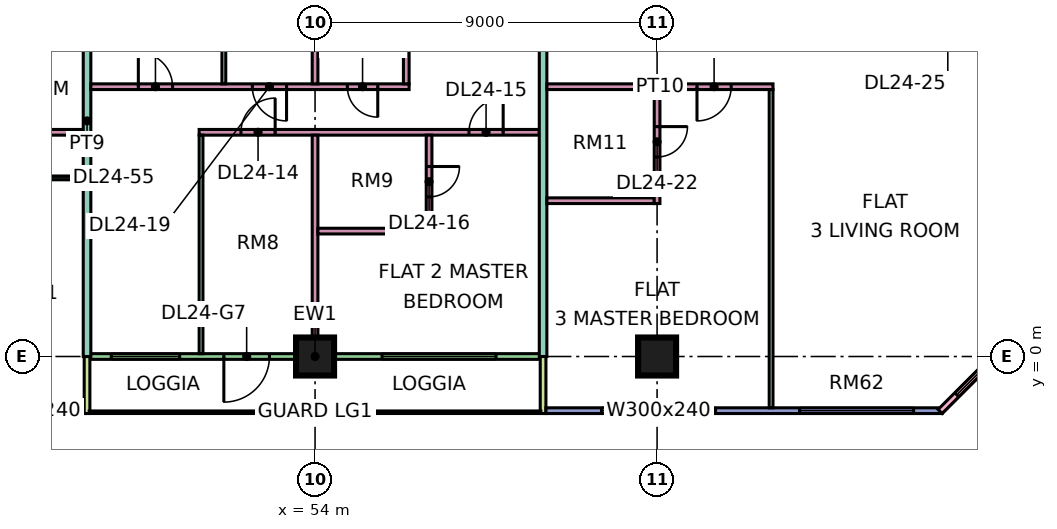
"""IFC4 building model, lengths in metres.
Left out: names, types, materials, properties, quantities, classifications, styles, units other than length and angle.
Written with IfcOpenShell. Run it as: python <this file> out.ifc"""

import sys

from ifc_helpers import new_model, si_unit, direction, frame, frame_2d, origin, origin_2d, place, context, subcontext, project, spatial, rectangle, extrude, element, fill, save


model = new_model("IFC4")
c1 = context("Model", 3, precision=1e-05, world=origin(), true_north=direction((0.0, 1.0)))
c2 = subcontext(c1, "Body", "Model", "MODEL_VIEW")
j1 = project(units=[si_unit("LENGTHUNIT", "METRE"), si_unit("PLANEANGLEUNIT", "RADIAN")], contexts=[c1])
p1 = place(None, origin())
s1 = spatial("IfcSite", under=j1, at=p1, CompositionType="ELEMENT")
p2 = place(p1, origin())
s2 = spatial("IfcBuilding", under=s1, at=p2, CompositionType="ELEMENT")
p3 = place(p2, frame((0.0, 0.0, 106.9)))
s3 = spatial("IfcBuildingStorey", under=s2, at=p3, CompositionType="ELEMENT", Elevation=106.9)
for number, where, z_axis, x_axis in (
    (1, (54.0, 0.0, 0.0), (0.0, 0.0, 1.0), (1.0, 0.0, 0.0)),
    (2, (63.0, 0.0, 0.0), (0.0, 0.0, 1.0), (1.0, 0.0, 0.0)),
):
    element("IfcColumn", number, at=place(p3, frame(where, z_axis=z_axis, x_axis=x_axis)), inside=s3, PredefinedType="COLUMN", context=c2, shape_type="SweptSolid", body=[
        extrude(rectangle(XDim=1.0, YDim=1.0, at=origin_2d()), origin(), (0.0, 0.0, 1.0), 3.75),
    ])
p4 = place(p3, frame((36.075, -1.425, 0.0), z_axis=(0.0, 0.0, 1.0), x_axis=(1.0, 0.0, 0.0)))
e3 = element("IfcWall", 3, at=p4, inside=s3, PredefinedType="SOLIDWALL", context=c2, shape_type="SweptSolid", body=[
    extrude(rectangle(XDim=11.85, YDim=0.15, at=frame_2d((5.925, 0.0))), origin(), (0.0, 0.0, 1.0), 3.35),
])
p5 = place(p4, frame((1.462, 0.0, 0.45)))
e4 = element("IfcOpeningElement", 4, at=p5, cuts=e3, PredefinedType="OPENING", context=c2, shape_type="SweptSolid", body=[
    extrude(rectangle(XDim=3.0, YDim=2.4, at=frame_2d((1.5, 1.2))), frame((0.0, 0.085, 0.0), z_axis=(0.0, -1.0, 0.0), x_axis=(1.0, 0.0, 0.0)), (0.0, 0.0, 1.0), 0.17),
])
p6 = place(p4, frame((6.525, 0.0, 0.45)))
e5 = element("IfcOpeningElement", 5, at=p6, cuts=e3, PredefinedType="OPENING", context=c2, shape_type="SweptSolid", body=[
    extrude(rectangle(XDim=1.8, YDim=2.4, at=frame_2d((0.9, 1.2))), frame((0.0, 0.085, 0.0), z_axis=(0.0, -1.0, 0.0), x_axis=(1.0, 0.0, 0.0)), (0.0, 0.0, 1.0), 0.17),
])
p7 = place(p4, frame((9.488, 0.0, 0.45)))
e6 = element("IfcOpeningElement", 6, at=p7, cuts=e3, PredefinedType="OPENING", context=c2, shape_type="SweptSolid", body=[
    extrude(rectangle(XDim=1.8, YDim=2.4, at=frame_2d((0.9, 1.2))), frame((0.0, 0.085, 0.0), z_axis=(0.0, -1.0, 0.0), x_axis=(1.0, 0.0, 0.0)), (0.0, 0.0, 1.0), 0.17),
])
p8 = place(p3, frame((48.075, 0.0, 0.0), z_axis=(0.0, 0.0, 1.0), x_axis=(1.0, 0.0, 0.0)))
e7 = element("IfcWall", 7, at=p8, inside=s3, PredefinedType="SOLIDWALL", context=c2, shape_type="SweptSolid", body=[
    extrude(rectangle(XDim=11.85, YDim=0.15, at=frame_2d((5.925, 0.0))), origin(), (0.0, 0.0, 1.0), 3.35),
])
p9 = place(p8, frame((0.562, 0.0, 0.45)))
e8 = element("IfcOpeningElement", 8, at=p9, cuts=e7, PredefinedType="OPENING", context=c2, shape_type="SweptSolid", body=[
    extrude(rectangle(XDim=1.8, YDim=2.4, at=frame_2d((0.9, 1.2))), frame((0.0, 0.085, 0.0), z_axis=(0.0, -1.0, 0.0), x_axis=(1.0, 0.0, 0.0)), (0.0, 0.0, 1.0), 0.17),
])
p10 = place(p8, frame((3.525, 0.0, 0.0)))
e9 = element("IfcOpeningElement", 9, at=p10, cuts=e7, PredefinedType="OPENING", context=c2, shape_type="SweptSolid", body=[
    extrude(rectangle(XDim=1.2, YDim=2.4, at=frame_2d((0.6, 1.2))), frame((0.0, 0.085, 0.0), z_axis=(0.0, -1.0, 0.0), x_axis=(1.0, 0.0, 0.0)), (0.0, 0.0, 1.0), 0.17),
])
p11 = place(p8, frame((7.688, 0.0, 0.45)))
e10 = element("IfcOpeningElement", 10, at=p11, cuts=e7, PredefinedType="OPENING", context=c2, shape_type="SweptSolid", body=[
    extrude(rectangle(XDim=3.0, YDim=2.4, at=frame_2d((1.5, 1.2))), frame((0.0, 0.085, 0.0), z_axis=(0.0, -1.0, 0.0), x_axis=(1.0, 0.0, 0.0)), (0.0, 0.0, 1.0), 0.17),
])
for number, where, z_axis, x_axis in (
    (11, (48.0, -1.5, 0.0), (0.0, 0.0, 1.0), (0.0, 1.0, 0.0)),
    (12, (60.0, -1.5, 0.0), (0.0, 0.0, 1.0), (0.0, 1.0, 0.0)),
):
    element("IfcWall", number, at=place(p3, frame(where, z_axis=z_axis, x_axis=x_axis)), inside=s3, PredefinedType="SOLIDWALL", context=c2, shape_type="SweptSolid", body=[
        extrude(rectangle(XDim=1.5, YDim=0.15, at=frame_2d((0.75, 0.0))), origin(), (0.0, 0.0, 1.0), 3.35),
    ])
p12 = place(p3, frame((60.075, -1.425, 0.0), z_axis=(0.0, 0.0, 1.0), x_axis=(1.0, 0.0, 0.0)))
e13 = element("IfcWall", 13, at=p12, inside=s3, PredefinedType="SOLIDWALL", context=c2, shape_type="SweptSolid", body=[
    extrude(rectangle(XDim=10.425, YDim=0.15, at=frame_2d((5.212, 0.0))), origin(), (0.0, 0.0, 1.0), 3.35),
])
p13 = place(p12, frame((1.462, 0.0, 0.45)))
e14 = element("IfcOpeningElement", 14, at=p13, cuts=e13, PredefinedType="OPENING", context=c2, shape_type="SweptSolid", body=[
    extrude(rectangle(XDim=3.0, YDim=2.4, at=frame_2d((1.5, 1.2))), frame((0.0, 0.085, 0.0), z_axis=(0.0, -1.0, 0.0), x_axis=(1.0, 0.0, 0.0)), (0.0, 0.0, 1.0), 0.17),
])
p14 = place(p12, frame((6.675, 0.0, 0.45)))
e15 = element("IfcOpeningElement", 15, at=p14, cuts=e13, PredefinedType="OPENING", context=c2, shape_type="SweptSolid", body=[
    extrude(rectangle(XDim=3.0, YDim=2.4, at=frame_2d((1.5, 1.2))), frame((0.0, 0.085, 0.0), z_axis=(0.0, -1.0, 0.0), x_axis=(1.0, 0.0, 0.0)), (0.0, 0.0, 1.0), 0.17),
])
p15 = place(p3, frame((70.447, -1.447, 0.0), z_axis=(0.0, 0.0, 1.0), x_axis=(0.707106781187, 0.707106781187, 0.0)))
e16 = element("IfcWall", 16, at=p15, inside=s3, PredefinedType="SOLIDWALL", context=c2, shape_type="SweptSolid", body=[
    extrude(rectangle(XDim=4.243, YDim=0.15, at=frame_2d((2.121, 0.0))), origin(), (0.0, 0.0, 1.0), 3.35),
])
p16 = place(p15, frame((0.621, 0.0, 0.45)))
e17 = element("IfcOpeningElement", 17, at=p16, cuts=e16, PredefinedType="OPENING", context=c2, shape_type="SweptSolid", body=[
    extrude(rectangle(XDim=3.0, YDim=2.4, at=frame_2d((1.5, 1.2))), frame((0.0, 0.085, 0.0), z_axis=(0.0, -1.0, 0.0), x_axis=(1.0, 0.0, 0.0)), (0.0, 0.0, 1.0), 0.17),
])
p17 = place(p3, frame((33.05, 4.7, 0.0), z_axis=(0.0, 0.0, 1.0), x_axis=(1.0, 0.0, 0.0)))
e18 = element("IfcWall", 18, at=p17, inside=s3, PredefinedType="PARTITIONING", context=c2, shape_type="SweptSolid", body=[
    extrude(rectangle(XDim=14.85, YDim=0.1, at=frame_2d((7.425, 0.0))), origin(), (0.0, 0.0, 1.0), 3.35),
])
p18 = place(p17, frame((10.0, 0.0, 0.0)))
e19 = element("IfcOpeningElement", 19, at=p18, cuts=e18, PredefinedType="OPENING", context=c2, shape_type="SweptSolid", body=[
    extrude(rectangle(XDim=0.9, YDim=2.1, at=frame_2d((0.45, 1.05))), frame((0.0, 0.06, 0.0), z_axis=(0.0, -1.0, 0.0), x_axis=(1.0, 0.0, 0.0)), (0.0, 0.0, 1.0), 0.12),
])
p19 = place(p17, frame((13.0, 0.0, 0.0)))
e20 = element("IfcOpeningElement", 20, at=p19, cuts=e18, PredefinedType="OPENING", context=c2, shape_type="SweptSolid", body=[
    extrude(rectangle(XDim=0.9, YDim=2.1, at=frame_2d((0.45, 1.05))), frame((0.0, 0.06, 0.0), z_axis=(0.0, -1.0, 0.0), x_axis=(1.0, 0.0, 0.0)), (0.0, 0.0, 1.0), 0.12),
])
p20 = place(p17, frame((4.0, 0.0, 0.0)))
e21 = element("IfcOpeningElement", 21, at=p20, cuts=e18, PredefinedType="OPENING", context=c2, shape_type="SweptSolid", body=[
    extrude(rectangle(XDim=0.9, YDim=2.1, at=frame_2d((0.45, 1.05))), frame((0.0, 0.06, 0.0), z_axis=(0.0, -1.0, 0.0), x_axis=(1.0, 0.0, 0.0)), (0.0, 0.0, 1.0), 0.12),
])
p21 = place(p3, frame((43.725, 5.9, 0.0), z_axis=(0.0, 0.0, 1.0), x_axis=(1.0, 0.0, 0.0)))
e22 = element("IfcWall", 22, at=p21, inside=s3, PredefinedType="PARTITIONING", context=c2, shape_type="SweptSolid", body=[
    extrude(rectangle(XDim=4.175, YDim=0.15, at=frame_2d((2.087, 0.0))), origin(), (0.0, 0.0, 1.0), 3.35),
])
p22 = place(p21, frame((1.675, 0.0, 0.0)))
e23 = element("IfcOpeningElement", 23, at=p22, cuts=e22, PredefinedType="OPENING", context=c2, shape_type="SweptSolid", body=[
    extrude(rectangle(XDim=0.8, YDim=2.1, at=frame_2d((0.4, 1.05))), frame((0.0, 0.085, 0.0), z_axis=(0.0, -1.0, 0.0), x_axis=(1.0, 0.0, 0.0)), (0.0, 0.0, 1.0), 0.17),
])
p23 = place(p3, frame((48.0, 0.0, 0.0), z_axis=(0.0, 0.0, 1.0), x_axis=(0.0, 1.0, 0.0)))
e24 = element("IfcWall", 24, at=p23, inside=s3, PredefinedType="PARTITIONING", context=c2, shape_type="SweptSolid", body=[
    extrude(rectangle(XDim=12.4, YDim=0.2, at=frame_2d((6.2, 0.0))), origin(), (0.0, 0.0, 1.0), 3.35),
])
p24 = place(p3, frame((48.1, 7.1, 0.0), z_axis=(0.0, 0.0, 1.0), x_axis=(1.0, 0.0, 0.0)))
e25 = element("IfcWall", 25, at=p24, inside=s3, PredefinedType="PARTITIONING", context=c2, shape_type="SweptSolid", body=[
    extrude(rectangle(XDim=8.375, YDim=0.15, at=frame_2d((4.188, 0.0))), origin(), (0.0, 0.0, 1.0), 3.35),
])
p25 = place(p24, frame((6.75, 0.0, 0.0)))
e26 = element("IfcOpeningElement", 26, at=p25, cuts=e25, PredefinedType="OPENING", context=c2, shape_type="SweptSolid", body=[
    extrude(rectangle(XDim=0.8, YDim=2.1, at=frame_2d((0.4, 1.05))), frame((0.0, 0.085, 0.0), z_axis=(0.0, -1.0, 0.0), x_axis=(1.0, 0.0, 0.0)), (0.0, 0.0, 1.0), 0.17),
])
p26 = place(p24, frame((1.25, 0.0, 0.0)))
e27 = element("IfcOpeningElement", 27, at=p26, cuts=e25, PredefinedType="OPENING", context=c2, shape_type="SweptSolid", body=[
    extrude(rectangle(XDim=0.9, YDim=2.1, at=frame_2d((0.45, 1.05))), frame((0.0, 0.085, 0.0), z_axis=(0.0, -1.0, 0.0), x_axis=(1.0, 0.0, 0.0)), (0.0, 0.0, 1.0), 0.17),
])
p27 = place(p24, frame((4.25, 0.0, 0.0)))
e28 = element("IfcOpeningElement", 28, at=p27, cuts=e25, PredefinedType="OPENING", context=c2, shape_type="SweptSolid", body=[
    extrude(rectangle(XDim=0.9, YDim=2.1, at=frame_2d((0.45, 1.05))), frame((0.0, 0.085, 0.0), z_axis=(0.0, -1.0, 0.0), x_axis=(1.0, 0.0, 0.0)), (0.0, 0.0, 1.0), 0.17),
])
p28 = place(p3, frame((50.95, 5.9, 0.0), z_axis=(0.0, 0.0, 1.0), x_axis=(1.0, 0.0, 0.0)))
e29 = element("IfcWall", 29, at=p28, inside=s3, PredefinedType="PARTITIONING", context=c2, shape_type="SweptSolid", body=[
    extrude(rectangle(XDim=8.95, YDim=0.15, at=frame_2d((4.475, 0.0))), origin(), (0.0, 0.0, 1.0), 3.35),
])
p29 = place(p28, frame((1.1, 0.0, 0.0)))
e30 = element("IfcOpeningElement", 30, at=p29, cuts=e29, PredefinedType="OPENING", context=c2, shape_type="SweptSolid", body=[
    extrude(rectangle(XDim=0.9, YDim=2.1, at=frame_2d((0.45, 1.05))), frame((0.0, 0.085, 0.0), z_axis=(0.0, -1.0, 0.0), x_axis=(1.0, 0.0, 0.0)), (0.0, 0.0, 1.0), 0.17),
])
p30 = place(p28, frame((7.1, 0.0, 0.0)))
e31 = element("IfcOpeningElement", 31, at=p30, cuts=e29, PredefinedType="OPENING", context=c2, shape_type="SweptSolid", body=[
    extrude(rectangle(XDim=0.9, YDim=2.1, at=frame_2d((0.45, 1.05))), frame((0.0, 0.085, 0.0), z_axis=(0.0, -1.0, 0.0), x_axis=(1.0, 0.0, 0.0)), (0.0, 0.0, 1.0), 0.17),
])
p31 = place(p3, frame((51.0, 0.074, 0.0), z_axis=(0.0, 0.0, 1.0), x_axis=(0.0, 1.0, 0.0)))
e32 = element("IfcWall", 32, at=p31, inside=s3, PredefinedType="PARTITIONING", context=c2, shape_type="SweptSolid", body=[
    extrude(rectangle(XDim=5.751, YDim=0.1, at=frame_2d((2.875, 0.0))), origin(), (0.0, 0.0, 1.0), 3.35),
])
p32 = place(p3, frame((51.6, 7.175, 0.0), z_axis=(0.0, 0.0, 1.0), x_axis=(0.0, 1.0, 0.0)))
e33 = element("IfcWall", 33, at=p32, inside=s3, PredefinedType="PARTITIONING", context=c2, shape_type="SweptSolid", body=[
    extrude(rectangle(XDim=5.225, YDim=0.1, at=frame_2d((2.612, 0.0))), origin(), (0.0, 0.0, 1.0), 3.35),
])
p33 = place(p3, frame((54.0, 0.074, 0.0), z_axis=(0.0, 0.0, 1.0), x_axis=(0.0, 1.0, 0.0)))
e34 = element("IfcWall", 34, at=p33, inside=s3, PredefinedType="PARTITIONING", context=c2, shape_type="SweptSolid", body=[
    extrude(rectangle(XDim=5.751, YDim=0.15, at=frame_2d((2.875, 0.0))), origin(), (0.0, 0.0, 1.0), 3.35),
])
p34 = place(p3, frame((54.0, 7.175, 0.0), z_axis=(0.0, 0.0, 1.0), x_axis=(0.0, 1.0, 0.0)))
e35 = element("IfcWall", 35, at=p34, inside=s3, PredefinedType="PARTITIONING", context=c2, shape_type="SweptSolid", body=[
    extrude(rectangle(XDim=5.225, YDim=0.15, at=frame_2d((2.612, 0.0))), origin(), (0.0, 0.0, 1.0), 3.35),
])
p35 = place(p3, frame((54.075, 3.3, 0.0), z_axis=(0.0, 0.0, 1.0), x_axis=(1.0, 0.0, 0.0)))
e36 = element("IfcWall", 36, at=p35, inside=s3, PredefinedType="PARTITIONING", context=c2, shape_type="SweptSolid", body=[
    extrude(rectangle(XDim=3.0, YDim=0.15, at=frame_2d((1.5, 0.0))), origin(), (0.0, 0.0, 1.0), 3.35),
])
p36 = place(p3, frame((56.4, 7.175, 0.0), z_axis=(0.0, 0.0, 1.0), x_axis=(0.0, 1.0, 0.0)))
e37 = element("IfcWall", 37, at=p36, inside=s3, PredefinedType="PARTITIONING", context=c2, shape_type="SweptSolid", body=[
    extrude(rectangle(XDim=5.225, YDim=0.15, at=frame_2d((2.612, 0.0))), origin(), (0.0, 0.0, 1.0), 3.35),
])
p37 = place(p3, frame((57.0, 3.375, 0.0), z_axis=(0.0, 0.0, 1.0), x_axis=(0.0, 1.0, 0.0)))
e38 = element("IfcWall", 38, at=p37, inside=s3, PredefinedType="PARTITIONING", context=c2, shape_type="SweptSolid", body=[
    extrude(rectangle(XDim=2.45, YDim=0.15, at=frame_2d((1.225, 0.0))), origin(), (0.0, 0.0, 1.0), 3.35),
])
p38 = place(p37, frame((0.825, 0.0, 0.0)))
e39 = element("IfcOpeningElement", 39, at=p38, cuts=e38, PredefinedType="OPENING", context=c2, shape_type="SweptSolid", body=[
    extrude(rectangle(XDim=0.8, YDim=2.1, at=frame_2d((0.4, 1.05))), frame((0.0, 0.085, 0.0), z_axis=(0.0, -1.0, 0.0), x_axis=(1.0, 0.0, 0.0)), (0.0, 0.0, 1.0), 0.17),
])
p39 = place(p3, frame((60.0, 0.0, 0.0), z_axis=(0.0, 0.0, 1.0), x_axis=(0.0, 1.0, 0.0)))
e40 = element("IfcWall", 40, at=p39, inside=s3, PredefinedType="PARTITIONING", context=c2, shape_type="SweptSolid", body=[
    extrude(rectangle(XDim=12.4, YDim=0.2, at=frame_2d((6.2, 0.0))), origin(), (0.0, 0.0, 1.0), 3.35),
])
p40 = place(p3, frame((60.1, 4.1, 0.0), z_axis=(0.0, 0.0, 1.0), x_axis=(1.0, 0.0, 0.0)))
e41 = element("IfcWall", 41, at=p40, inside=s3, PredefinedType="PARTITIONING", context=c2, shape_type="SweptSolid", body=[
    extrude(rectangle(XDim=2.825, YDim=0.15, at=frame_2d((1.413, 0.0))), origin(), (0.0, 0.0, 1.0), 3.35),
])
p41 = place(p3, frame((60.1, 7.1, 0.0), z_axis=(0.0, 0.0, 1.0), x_axis=(1.0, 0.0, 0.0)))
e42 = element("IfcWall", 42, at=p41, inside=s3, PredefinedType="PARTITIONING", context=c2, shape_type="SweptSolid", body=[
    extrude(rectangle(XDim=5.95, YDim=0.15, at=frame_2d((2.975, 0.0))), origin(), (0.0, 0.0, 1.0), 3.35),
])
p42 = place(p41, frame((3.95, 0.0, 0.0)))
e43 = element("IfcOpeningElement", 43, at=p42, cuts=e42, PredefinedType="OPENING", context=c2, shape_type="SweptSolid", body=[
    extrude(rectangle(XDim=0.9, YDim=2.1, at=frame_2d((0.45, 1.05))), frame((0.0, 0.085, 0.0), z_axis=(0.0, -1.0, 0.0), x_axis=(1.0, 0.0, 0.0)), (0.0, 0.0, 1.0), 0.17),
])
p43 = place(p3, frame((63.0, 4.025, 0.0), z_axis=(0.0, 0.0, 1.0), x_axis=(0.0, 1.0, 0.0)))
e44 = element("IfcWall", 44, at=p43, inside=s3, PredefinedType="PARTITIONING", context=c2, shape_type="SweptSolid", body=[
    extrude(rectangle(XDim=3.0, YDim=0.15, at=frame_2d((1.5, 0.0))), origin(), (0.0, 0.0, 1.0), 3.35),
])
p44 = place(p43, frame((1.225, 0.0, 0.0)))
e45 = element("IfcOpeningElement", 45, at=p44, cuts=e44, PredefinedType="OPENING", context=c2, shape_type="SweptSolid", body=[
    extrude(rectangle(XDim=0.8, YDim=2.1, at=frame_2d((0.4, 1.05))), frame((0.0, 0.085, 0.0), z_axis=(0.0, -1.0, 0.0), x_axis=(1.0, 0.0, 0.0)), (0.0, 0.0, 1.0), 0.17),
])
p45 = place(p3, frame((66.0, -1.35, 0.0), z_axis=(0.0, 0.0, 1.0), x_axis=(0.0, 1.0, 0.0)))
e46 = element("IfcWall", 46, at=p45, inside=s3, PredefinedType="PARTITIONING", context=c2, shape_type="SweptSolid", body=[
    extrude(rectangle(XDim=8.375, YDim=0.1, at=frame_2d((4.188, 0.0))), origin(), (0.0, 0.0, 1.0), 3.35),
])
p46 = place(p7, origin())
e47 = element("IfcWindow", 47, at=p46, inside=s3, PartitioningType="SINGLE_PANEL", PredefinedType="WINDOW", context=c2, shape_type="SweptSolid", body=[
    extrude(rectangle(XDim=1.8, YDim=2.4, at=frame_2d((0.9, 1.2))), frame((0.0, 0.03, 0.0), z_axis=(0.0, -1.0, 0.0), x_axis=(1.0, 0.0, 0.0)), (0.0, 0.0, 1.0), 0.06),
])
fill(e6, e47)
p47 = place(p9, origin())
e48 = element("IfcWindow", 48, at=p47, inside=s3, PartitioningType="SINGLE_PANEL", PredefinedType="WINDOW", context=c2, shape_type="SweptSolid", body=[
    extrude(rectangle(XDim=1.8, YDim=2.4, at=frame_2d((0.9, 1.2))), frame((0.0, 0.03, 0.0), z_axis=(0.0, -1.0, 0.0), x_axis=(1.0, 0.0, 0.0)), (0.0, 0.0, 1.0), 0.06),
])
fill(e8, e48)
p48 = place(p10, frame((1.2, 0.0, 0.0), z_axis=(0.0, 0.0, 1.0), x_axis=(-1.0, 0.0, 0.0)))
e49 = element("IfcDoor", 49, at=p48, inside=s3, OperationType="DOUBLE_DOOR_SINGLE_SWING", PredefinedType="DOOR", context=c2, shape_type="SweptSolid", body=[
    extrude(rectangle(XDim=1.2, YDim=2.4, at=frame_2d((0.6, 1.2))), frame((0.0, 0.025, 0.0), z_axis=(0.0, -1.0, 0.0), x_axis=(1.0, 0.0, 0.0)), (0.0, 0.0, 1.0), 0.05),
])
fill(e9, e49)
p49 = place(p11, origin())
e50 = element("IfcWindow", 50, at=p49, inside=s3, PartitioningType="SINGLE_PANEL", PredefinedType="WINDOW", context=c2, shape_type="SweptSolid", body=[
    extrude(rectangle(XDim=3.0, YDim=2.4, at=frame_2d((1.5, 1.2))), frame((0.0, 0.03, 0.0), z_axis=(0.0, -1.0, 0.0), x_axis=(1.0, 0.0, 0.0)), (0.0, 0.0, 1.0), 0.06),
])
fill(e10, e50)
p50 = place(p13, origin())
e51 = element("IfcWindow", 51, at=p50, inside=s3, PartitioningType="SINGLE_PANEL", PredefinedType="WINDOW", context=c2, shape_type="SweptSolid", body=[
    extrude(rectangle(XDim=3.0, YDim=2.4, at=frame_2d((1.5, 1.2))), frame((0.0, 0.03, 0.0), z_axis=(0.0, -1.0, 0.0), x_axis=(1.0, 0.0, 0.0)), (0.0, 0.0, 1.0), 0.06),
])
fill(e14, e51)
p51 = place(p14, origin())
e52 = element("IfcWindow", 52, at=p51, inside=s3, PartitioningType="SINGLE_PANEL", PredefinedType="WINDOW", context=c2, shape_type="SweptSolid", body=[
    extrude(rectangle(XDim=3.0, YDim=2.4, at=frame_2d((1.5, 1.2))), frame((0.0, 0.03, 0.0), z_axis=(0.0, -1.0, 0.0), x_axis=(1.0, 0.0, 0.0)), (0.0, 0.0, 1.0), 0.06),
])
fill(e15, e52)
p52 = place(p16, origin())
e53 = element("IfcWindow", 53, at=p52, inside=s3, PartitioningType="SINGLE_PANEL", PredefinedType="WINDOW", context=c2, shape_type="SweptSolid", body=[
    extrude(rectangle(XDim=3.0, YDim=2.4, at=frame_2d((1.5, 1.2))), frame((0.0, 0.03, 0.0), z_axis=(0.0, -1.0, 0.0), x_axis=(1.0, 0.0, 0.0)), (0.0, 0.0, 1.0), 0.06),
])
fill(e17, e53)
p53 = place(p25, origin())
e54 = element("IfcDoor", 54, at=p53, inside=s3, OperationType="SINGLE_SWING_RIGHT", PredefinedType="DOOR", context=c2, shape_type="SweptSolid", body=[
    extrude(rectangle(XDim=0.8, YDim=2.1, at=frame_2d((0.4, 1.05))), frame((0.0, 0.025, 0.0), z_axis=(0.0, -1.0, 0.0), x_axis=(1.0, 0.0, 0.0)), (0.0, 0.0, 1.0), 0.05),
])
fill(e26, e54)
p54 = place(p29, frame((0.9, 0.0, 0.0), z_axis=(0.0, 0.0, 1.0), x_axis=(-1.0, 0.0, 0.0)))
e55 = element("IfcDoor", 55, at=p54, inside=s3, OperationType="SINGLE_SWING_RIGHT", PredefinedType="DOOR", context=c2, shape_type="SweptSolid", body=[
    extrude(rectangle(XDim=0.9, YDim=2.1, at=frame_2d((0.45, 1.05))), frame((0.0, 0.025, 0.0), z_axis=(0.0, -1.0, 0.0), x_axis=(1.0, 0.0, 0.0)), (0.0, 0.0, 1.0), 0.05),
])
fill(e30, e55)
p55 = place(p30, frame((0.9, 0.0, 0.0), z_axis=(0.0, 0.0, 1.0), x_axis=(-1.0, 0.0, 0.0)))
e56 = element("IfcDoor", 56, at=p55, inside=s3, OperationType="SINGLE_SWING_RIGHT", PredefinedType="DOOR", context=c2, shape_type="SweptSolid", body=[
    extrude(rectangle(XDim=0.9, YDim=2.1, at=frame_2d((0.45, 1.05))), frame((0.0, 0.025, 0.0), z_axis=(0.0, -1.0, 0.0), x_axis=(1.0, 0.0, 0.0)), (0.0, 0.0, 1.0), 0.05),
])
fill(e31, e56)
p56 = place(p38, origin())
e57 = element("IfcDoor", 57, at=p56, inside=s3, OperationType="SINGLE_SWING_RIGHT", PredefinedType="DOOR", context=c2, shape_type="SweptSolid", body=[
    extrude(rectangle(XDim=0.8, YDim=2.1, at=frame_2d((0.4, 1.05))), frame((0.0, 0.025, 0.0), z_axis=(0.0, -1.0, 0.0), x_axis=(1.0, 0.0, 0.0)), (0.0, 0.0, 1.0), 0.05),
])
fill(e39, e57)
p57 = place(p26, origin())
e58 = element("IfcDoor", 58, at=p57, inside=s3, OperationType="SINGLE_SWING_LEFT", PredefinedType="DOOR", context=c2, shape_type="SweptSolid", body=[
    extrude(rectangle(XDim=0.9, YDim=2.1, at=frame_2d((0.45, 1.05))), frame((0.0, 0.025, 0.0), z_axis=(0.0, -1.0, 0.0), x_axis=(1.0, 0.0, 0.0)), (0.0, 0.0, 1.0), 0.05),
])
fill(e27, e58)
p58 = place(p27, origin())
e59 = element("IfcDoor", 59, at=p58, inside=s3, OperationType="SINGLE_SWING_RIGHT", PredefinedType="DOOR", context=c2, shape_type="SweptSolid", body=[
    extrude(rectangle(XDim=0.9, YDim=2.1, at=frame_2d((0.45, 1.05))), frame((0.0, 0.025, 0.0), z_axis=(0.0, -1.0, 0.0), x_axis=(1.0, 0.0, 0.0)), (0.0, 0.0, 1.0), 0.05),
])
fill(e28, e59)
p59 = place(p42, frame((0.9, 0.0, 0.0), z_axis=(0.0, 0.0, 1.0), x_axis=(-1.0, 0.0, 0.0)))
e60 = element("IfcDoor", 60, at=p59, inside=s3, OperationType="SINGLE_SWING_LEFT", PredefinedType="DOOR", context=c2, shape_type="SweptSolid", body=[
    extrude(rectangle(XDim=0.9, YDim=2.1, at=frame_2d((0.45, 1.05))), frame((0.0, 0.025, 0.0), z_axis=(0.0, -1.0, 0.0), x_axis=(1.0, 0.0, 0.0)), (0.0, 0.0, 1.0), 0.05),
])
fill(e43, e60)
p60 = place(p44, origin())
e61 = element("IfcDoor", 61, at=p60, inside=s3, OperationType="SINGLE_SWING_RIGHT", PredefinedType="DOOR", context=c2, shape_type="SweptSolid", body=[
    extrude(rectangle(XDim=0.8, YDim=2.1, at=frame_2d((0.4, 1.05))), frame((0.0, 0.025, 0.0), z_axis=(0.0, -1.0, 0.0), x_axis=(1.0, 0.0, 0.0)), (0.0, 0.0, 1.0), 0.05),
])
fill(e45, e61)
save(model, sys.argv[1])
